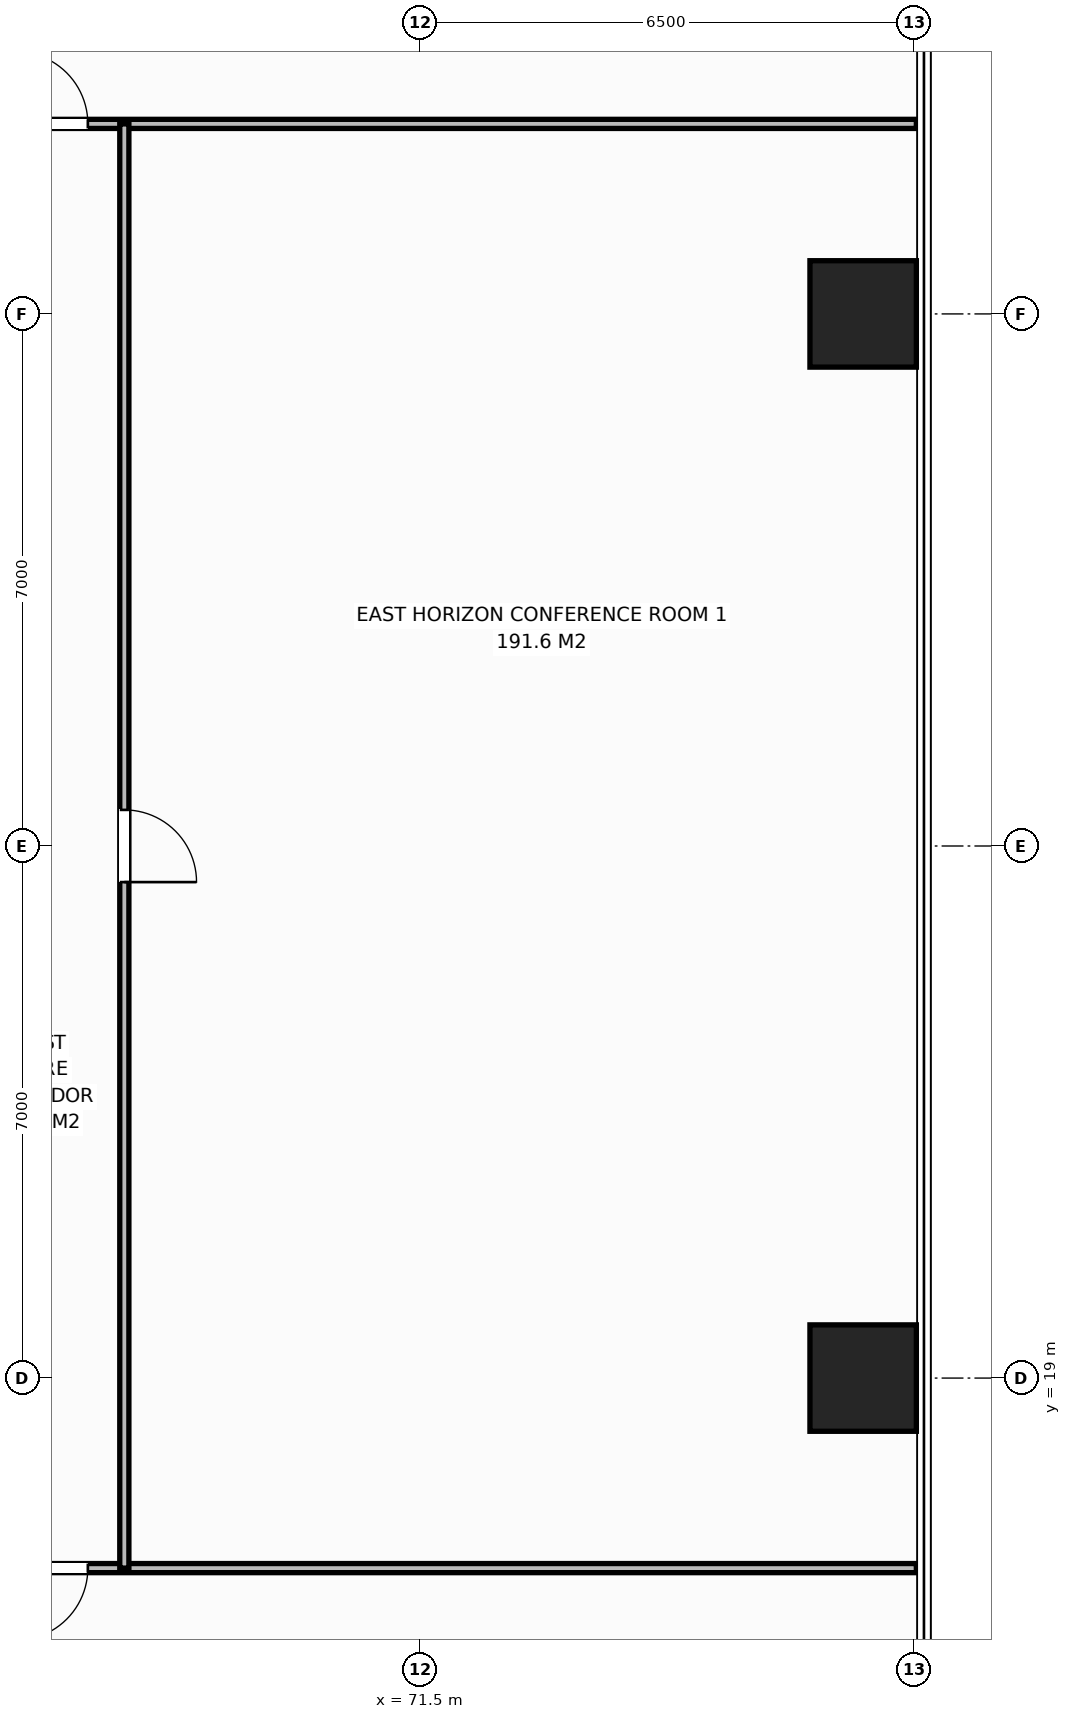
"""IFC4 building model, lengths in metres.
Left out: names, types, materials, properties, quantities, classifications, styles, units other than length and angle.
Written with IfcOpenShell. Run it as: python <this file> out.ifc"""

import sys

from ifc_helpers import new_model, si_unit, direction, frame, frame_2d, origin, origin_2d, place, context, subcontext, project, spatial, rectangle, extrude, element, fill, save


model = new_model("IFC4")
c1 = context("Model", 3, precision=1e-05, world=origin(), true_north=direction((0.0, 1.0)))
c2 = subcontext(c1, "Body", "Model", "MODEL_VIEW")
j1 = project(units=[si_unit("LENGTHUNIT", "METRE"), si_unit("PLANEANGLEUNIT", "RADIAN")], contexts=[c1])
p1 = place(None, origin())
s1 = spatial("IfcSite", under=j1, at=p1, CompositionType="ELEMENT")
p2 = place(p1, origin())
s2 = spatial("IfcBuilding", under=s1, at=p2, CompositionType="ELEMENT")
p3 = place(p2, frame((0.0, 0.0, 50.6)))
s3 = spatial("IfcBuildingStorey", under=s2, at=p3, CompositionType="ELEMENT", Elevation=50.6)
for number, where, z_axis, x_axis in (
    (1, (77.32, 19.0, 0.0), (0.0, 0.0, 1.0), (1.0, 0.0, 0.0)),
    (2, (77.32, 33.0, 0.0), (0.0, 0.0, 1.0), (1.0, 0.0, 0.0)),
):
    element("IfcColumn", number, at=place(p3, frame(where, z_axis=z_axis, x_axis=x_axis)), inside=s3, PredefinedType="COLUMN", context=c2, shape_type="SweptSolid", body=[
        extrude(rectangle(XDim=1.4, YDim=1.4, at=origin_2d()), origin(), (0.0, 0.0, 1.0), 3.8),
    ])
p4 = place(p3, frame((64.86, 35.5, 0.0), z_axis=(0.0, 0.0, 1.0), x_axis=(1.0, 0.0, 0.0)))
e3 = element("IfcWall", 3, at=p4, inside=s3, PredefinedType="PARTITIONING", context=c2, shape_type="SweptSolid", body=[
    extrude(rectangle(XDim=13.16, YDim=0.12, at=frame_2d((6.58, 0.0))), origin(), (0.0, 0.0, 1.0), 3.55),
])
p5 = place(p4, frame((1.31, 0.0, 0.0)))
e4 = element("IfcOpeningElement", 4, at=p5, cuts=e3, PredefinedType="OPENING", context=c2, shape_type="SweptSolid", body=[
    extrude(rectangle(XDim=0.95, YDim=2.15, at=frame_2d((0.475, 1.075))), frame((0.0, 0.07, 0.0), z_axis=(0.0, -1.0, 0.0), x_axis=(1.0, 0.0, 0.0)), (0.0, 0.0, 1.0), 0.14),
])
p6 = place(p3, frame((47.465, 16.5, 0.0), z_axis=(0.0, 0.0, 1.0), x_axis=(1.0, 0.0, 0.0)))
e5 = element("IfcWall", 5, at=p6, inside=s3, PredefinedType="PARTITIONING", context=c2, shape_type="SweptSolid", body=[
    extrude(rectangle(XDim=30.555, YDim=0.12, at=frame_2d((15.278, 0.0))), origin(), (0.0, 0.0, 1.0), 3.55),
])
p7 = place(p6, frame((18.705, 0.0, 0.0)))
e6 = element("IfcOpeningElement", 6, at=p7, cuts=e5, PredefinedType="OPENING", context=c2, shape_type="SweptSolid", body=[
    extrude(rectangle(XDim=0.95, YDim=2.15, at=frame_2d((0.475, 1.075))), frame((0.0, 0.07, 0.0), z_axis=(0.0, -1.0, 0.0), x_axis=(1.0, 0.0, 0.0)), (0.0, 0.0, 1.0), 0.14),
])
p8 = place(p3, frame((67.6, 16.5, 0.0), z_axis=(0.0, 0.0, 1.0), x_axis=(0.0, 1.0, 0.0)))
e7 = element("IfcWall", 7, at=p8, inside=s3, PredefinedType="PARTITIONING", context=c2, shape_type="SweptSolid", body=[
    extrude(rectangle(XDim=19.0, YDim=0.12, at=frame_2d((9.5, 0.0))), origin(), (0.0, 0.0, 1.0), 3.55),
])
p9 = place(p8, frame((9.025, 0.0, 0.0)))
e8 = element("IfcOpeningElement", 8, at=p9, cuts=e7, PredefinedType="OPENING", context=c2, shape_type="SweptSolid", body=[
    extrude(rectangle(XDim=0.95, YDim=2.15, at=frame_2d((0.475, 1.075))), frame((0.0, 0.07, 0.0), z_axis=(0.0, -1.0, 0.0), x_axis=(1.0, 0.0, 0.0)), (0.0, 0.0, 1.0), 0.14),
])
p10 = place(p5, origin())
e9 = element("IfcDoor", 9, at=p10, inside=s3, OperationType="SINGLE_SWING_LEFT", PredefinedType="DOOR", context=c2, shape_type="SweptSolid", body=[
    extrude(rectangle(XDim=0.95, YDim=2.15, at=frame_2d((0.475, 1.075))), frame((0.0, 0.025, 0.0), z_axis=(0.0, -1.0, 0.0), x_axis=(1.0, 0.0, 0.0)), (0.0, 0.0, 1.0), 0.05),
])
fill(e4, e9)
p11 = place(p7, origin())
e10 = element("IfcDoor", 10, at=p11, inside=s3, OperationType="SINGLE_SWING_RIGHT", PredefinedType="DOOR", context=c2, shape_type="SweptSolid", body=[
    extrude(rectangle(XDim=0.95, YDim=2.15, at=frame_2d((0.475, 1.075))), frame((0.0, 0.025, 0.0), z_axis=(0.0, -1.0, 0.0), x_axis=(1.0, 0.0, 0.0)), (0.0, 0.0, 1.0), 0.05),
])
fill(e6, e10)
p12 = place(p9, origin())
e11 = element("IfcDoor", 11, at=p12, inside=s3, OperationType="SINGLE_SWING_RIGHT", PredefinedType="DOOR", context=c2, shape_type="SweptSolid", body=[
    extrude(rectangle(XDim=0.95, YDim=2.15, at=frame_2d((0.475, 1.075))), frame((0.0, 0.025, 0.0), z_axis=(0.0, -1.0, 0.0), x_axis=(1.0, 0.0, 0.0)), (0.0, 0.0, 1.0), 0.05),
])
fill(e8, e11)
save(model, sys.argv[1])
